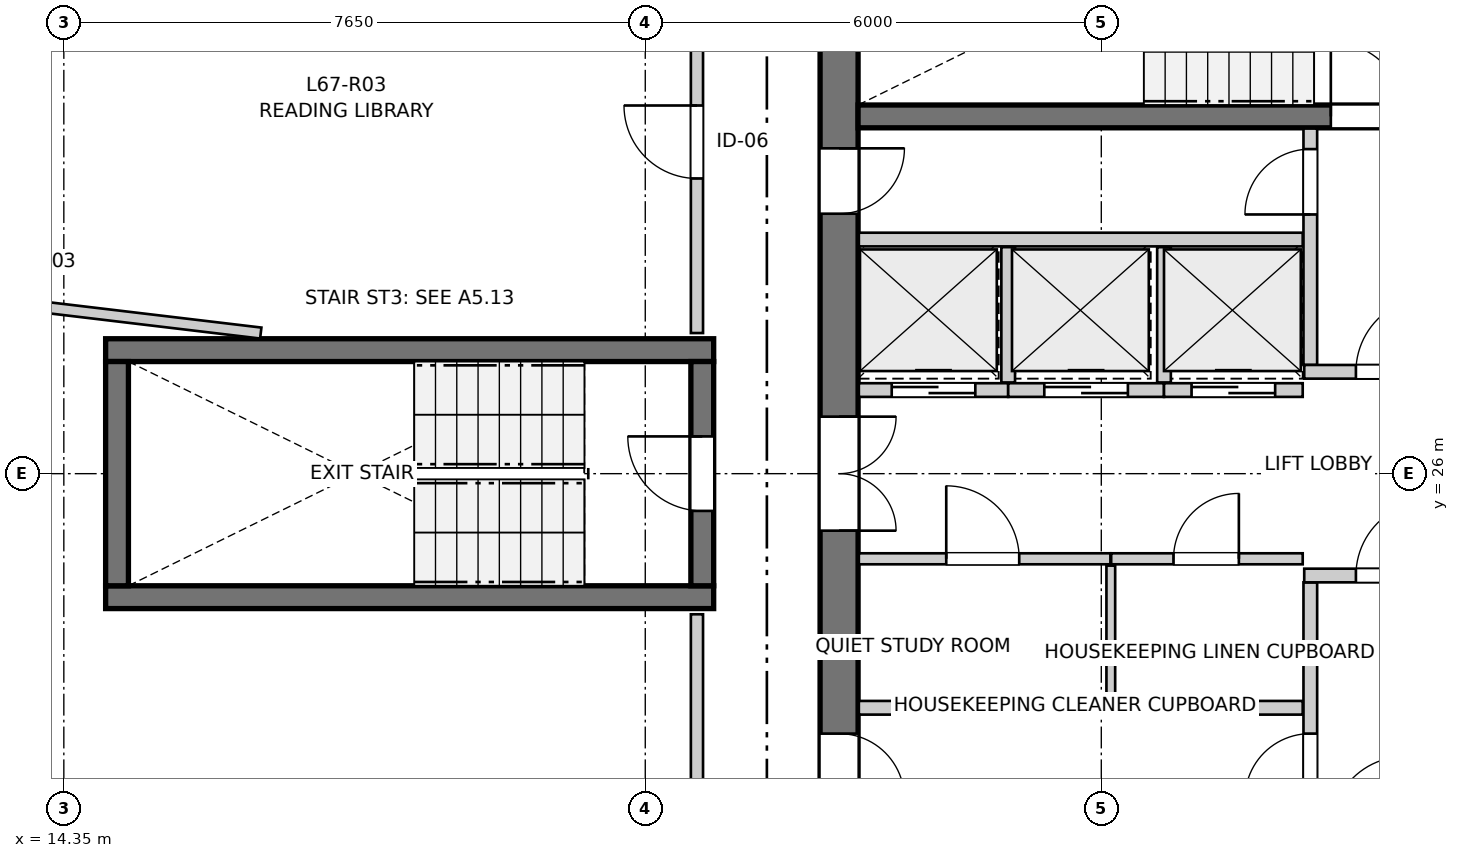
"""IFC4 building model, lengths in metres.
Left out: names, types, materials, properties, quantities, classifications, styles, units other than length and angle.
Written with IfcOpenShell. Run it as: python <this file> out.ifc"""

import sys

from ifc_helpers import new_model, si_unit, direction, frame, frame_2d, origin, place, context, subcontext, project, spatial, rectangle, extrude, source, transform, mapped, element, fill, save


model = new_model("IFC4")
c1 = context("Model", 3, precision=1e-05, world=origin(), true_north=direction((0.0, 1.0)))
c2 = subcontext(c1, "Body", "Model", "MODEL_VIEW")
j1 = project(units=[si_unit("LENGTHUNIT", "METRE"), si_unit("PLANEANGLEUNIT", "RADIAN")], contexts=[c1])
p1 = place(None, origin())
s1 = spatial("IfcSite", under=j1, at=p1, CompositionType="ELEMENT")
p2 = place(p1, origin())
s2 = spatial("IfcBuilding", under=s1, at=p2, CompositionType="ELEMENT")
p3 = place(p2, frame((0.0, 0.0, 224.4)))
s3 = spatial("IfcBuildingStorey", under=s2, at=p3, CompositionType="ELEMENT", Elevation=224.4)
p4 = place(p3, frame((24.55, 33.8, 0.0), z_axis=(0.0, 0.0, 1.0), x_axis=(0.0, -1.0, 0.0)))
e1 = element("IfcWall", 1, at=p4, inside=s3, PredefinedType="SHEAR", context=c2, shape_type="SweptSolid", body=[
    extrude(rectangle(XDim=15.6, YDim=0.5, at=frame_2d((7.8, 0.0))), origin(), (0.0, 0.0, 1.0), 2.96),
])
p5 = place(p4, frame((7.05, 0.0, 0.0)))
e2 = element("IfcOpeningElement", 2, at=p5, cuts=e1, PredefinedType="OPENING", context=c2, shape_type="SweptSolid", body=[
    extrude(rectangle(XDim=1.5, YDim=2.15, at=frame_2d((0.75, 1.075))), frame((0.0, 0.26, 0.0), z_axis=(0.0, -1.0, 0.0), x_axis=(1.0, 0.0, 0.0)), (0.0, 0.0, 1.0), 0.52),
])
p6 = place(p4, frame((3.52, 0.0, 0.0)))
e3 = element("IfcOpeningElement", 3, at=p6, cuts=e1, PredefinedType="OPENING", context=c2, shape_type="SweptSolid", body=[
    extrude(rectangle(XDim=0.86, YDim=2.05, at=frame_2d((0.43, 1.025))), frame((0.0, 0.26, 0.0), z_axis=(0.0, -1.0, 0.0), x_axis=(1.0, 0.0, 0.0)), (0.0, 0.0, 1.0), 0.52),
])
p7 = place(p4, frame((11.22, 0.0, 0.0)))
e4 = element("IfcOpeningElement", 4, at=p7, cuts=e1, PredefinedType="OPENING", context=c2, shape_type="SweptSolid", body=[
    extrude(rectangle(XDim=0.86, YDim=2.05, at=frame_2d((0.43, 1.025))), frame((0.0, 0.26, 0.0), z_axis=(0.0, -1.0, 0.0), x_axis=(1.0, 0.0, 0.0)), (0.0, 0.0, 1.0), 0.52),
])
p8 = place(p3, frame((24.8, 30.7, 0.0), z_axis=(0.0, 0.0, 1.0), x_axis=(1.0, 0.0, 0.0)))
e5 = element("IfcWall", 5, at=p8, inside=s3, PredefinedType="SHEAR", context=c2, shape_type="SweptSolid", body=[
    extrude(rectangle(XDim=11.1, YDim=0.3, at=frame_2d((5.55, 0.0))), origin(), (0.0, 0.0, 1.0), 2.96),
])
p9 = place(p8, frame((6.22, 0.0, 0.0)))
e6 = element("IfcOpeningElement", 6, at=p9, cuts=e5, PredefinedType="OPENING", context=c2, shape_type="SweptSolid", body=[
    extrude(rectangle(XDim=0.98, YDim=2.15, at=frame_2d((0.49, 1.075))), frame((0.0, 0.16, 0.0), z_axis=(0.0, -1.0, 0.0), x_axis=(1.0, 0.0, 0.0)), (0.0, 0.0, 1.0), 0.32),
])
p10 = place(p8, frame((9.15, 0.0, 0.0)))
e7 = element("IfcOpeningElement", 7, at=p10, cuts=e5, PredefinedType="OPENING", context=c2, shape_type="SweptSolid", body=[
    extrude(rectangle(XDim=1.15, YDim=2.15, at=frame_2d((0.575, 1.075))), frame((0.0, 0.16, 0.0), z_axis=(0.0, -1.0, 0.0), x_axis=(1.0, 0.0, 0.0)), (0.0, 0.0, 1.0), 0.32),
])
for number, where, z_axis, x_axis in (
    (8, (14.9, 24.375, 0.0), (0.0, 0.0, 1.0), (1.0, 0.0, 0.0)),
    (9, (22.9, 27.625, 0.0), (0.0, 0.0, 1.0), (-1.0, 0.0, 0.0)),
):
    element("IfcWall", number, at=place(p3, frame(where, z_axis=z_axis, x_axis=x_axis)), inside=s3, PredefinedType="SHEAR", context=c2, shape_type="SweptSolid", body=[
        extrude(rectangle(XDim=8.0, YDim=0.3, at=frame_2d((4.0, 0.0))), origin(), (0.0, 0.0, 1.0), 2.96),
    ])
p11 = place(p3, frame((15.05, 27.475, 0.0), z_axis=(0.0, 0.0, 1.0), x_axis=(0.0, -1.0, 0.0)))
e10 = element("IfcWall", 10, at=p11, inside=s3, PredefinedType="SHEAR", context=c2, shape_type="SweptSolid", body=[
    extrude(rectangle(XDim=2.95, YDim=0.3, at=frame_2d((1.475, 0.0))), origin(), (0.0, 0.0, 1.0), 2.96),
])
p12 = place(p3, frame((22.75, 24.525, 0.0), z_axis=(0.0, 0.0, 1.0), x_axis=(0.0, 1.0, 0.0)))
e11 = element("IfcWall", 11, at=p12, inside=s3, PredefinedType="SHEAR", context=c2, shape_type="SweptSolid", body=[
    extrude(rectangle(XDim=2.95, YDim=0.3, at=frame_2d((1.475, 0.0))), origin(), (0.0, 0.0, 1.0), 2.96),
])
p13 = place(p12, frame((0.985, 0.0, 0.0)))
e12 = element("IfcOpeningElement", 12, at=p13, cuts=e11, PredefinedType="OPENING", context=c2, shape_type="SweptSolid", body=[
    extrude(rectangle(XDim=0.98, YDim=2.15, at=frame_2d((0.49, 1.075))), frame((0.0, 0.16, 0.0), z_axis=(0.0, -1.0, 0.0), x_axis=(1.0, 0.0, 0.0)), (0.0, 0.0, 1.0), 0.32),
])
p14 = place(p3, frame((14.65, 32.607, 0.0), z_axis=(0.0, 0.0, 1.0), x_axis=(-0.657629046069, -0.753341912923, 0.0)))
e13 = element("IfcWall", 13, at=p14, inside=s3, PredefinedType="SOLIDWALL", context=c2, shape_type="SweptSolid", body=[
    extrude(rectangle(XDim=2.153, YDim=0.32, at=frame_2d((1.076, 0.0))), origin(), (0.0, 0.0, 1.0), 2.58),
])
p15 = place(p14, frame((0.316, 0.0, 0.82)))
e14 = element("IfcOpeningElement", 14, at=p15, cuts=e13, PredefinedType="OPENING", context=c2, shape_type="SweptSolid", body=[
    extrude(rectangle(XDim=1.45, YDim=1.25, at=frame_2d((0.725, 0.625))), frame((0.0, 0.17, 0.0), z_axis=(0.0, -1.0, 0.0), x_axis=(1.0, 0.0, 0.0)), (0.0, 0.0, 1.0), 0.34),
])
p16 = place(p3, frame((30.75, 21.46, 0.0), z_axis=(0.0, 0.0, 1.0), x_axis=(0.0, 1.0, 0.0)))
e15 = element("IfcWall", 15, at=p16, inside=s3, PredefinedType="PARTITIONING", context=c2, shape_type="SweptSolid", body=[
    extrude(rectangle(XDim=3.11, YDim=0.18, at=frame_2d((1.555, 0.0))), origin(), (0.0, 0.0, 1.0), 2.96),
])
p17 = place(p16, frame((0.26, 0.0, 0.0)))
e16 = element("IfcOpeningElement", 16, at=p17, cuts=e15, PredefinedType="OPENING", context=c2, shape_type="SweptSolid", body=[
    extrude(rectangle(XDim=0.86, YDim=2.05, at=frame_2d((0.43, 1.025))), frame((0.0, 0.1, 0.0), z_axis=(0.0, -1.0, 0.0), x_axis=(1.0, 0.0, 0.0)), (0.0, 0.0, 1.0), 0.2),
])
p18 = place(p3, frame((30.67, 24.66, 0.0), z_axis=(0.0, 0.0, 1.0), x_axis=(1.0, 0.0, 0.0)))
e17 = element("IfcWall", 17, at=p18, inside=s3, PredefinedType="PARTITIONING", context=c2, shape_type="SweptSolid", body=[
    extrude(rectangle(XDim=5.22, YDim=0.18, at=frame_2d((2.61, 0.0))), origin(), (0.0, 0.0, 1.0), 2.96),
])
p19 = place(p18, frame((0.68, 0.0, 0.0)))
e18 = element("IfcOpeningElement", 18, at=p19, cuts=e17, PredefinedType="OPENING", context=c2, shape_type="SweptSolid", body=[
    extrude(rectangle(XDim=0.98, YDim=2.15, at=frame_2d((0.49, 1.075))), frame((0.0, 0.1, 0.0), z_axis=(0.0, -1.0, 0.0), x_axis=(1.0, 0.0, 0.0)), (0.0, 0.0, 1.0), 0.2),
])
p20 = place(p3, frame((30.75, 27.43, 0.0), z_axis=(0.0, 0.0, 1.0), x_axis=(0.0, 1.0, 0.0)))
e19 = element("IfcWall", 19, at=p20, inside=s3, PredefinedType="PARTITIONING", context=c2, shape_type="SweptSolid", body=[
    extrude(rectangle(XDim=3.11, YDim=0.18, at=frame_2d((1.555, 0.0))), origin(), (0.0, 0.0, 1.0), 2.96),
])
p21 = place(p20, frame((1.98, 0.0, 0.0)))
e20 = element("IfcOpeningElement", 20, at=p21, cuts=e19, PredefinedType="OPENING", context=c2, shape_type="SweptSolid", body=[
    extrude(rectangle(XDim=0.86, YDim=2.05, at=frame_2d((0.43, 1.025))), frame((0.0, 0.1, 0.0), z_axis=(0.0, -1.0, 0.0), x_axis=(1.0, 0.0, 0.0)), (0.0, 0.0, 1.0), 0.2),
])
p22 = place(p3, frame((30.67, 27.34, 0.0), z_axis=(0.0, 0.0, 1.0), x_axis=(1.0, 0.0, 0.0)))
e21 = element("IfcWall", 21, at=p22, inside=s3, PredefinedType="PARTITIONING", context=c2, shape_type="SweptSolid", body=[
    extrude(rectangle(XDim=5.22, YDim=0.18, at=frame_2d((2.61, 0.0))), origin(), (0.0, 0.0, 1.0), 2.96),
])
p23 = place(p22, frame((0.68, 0.0, 0.0)))
e22 = element("IfcOpeningElement", 22, at=p23, cuts=e21, PredefinedType="OPENING", context=c2, shape_type="SweptSolid", body=[
    extrude(rectangle(XDim=0.98, YDim=2.15, at=frame_2d((0.49, 1.075))), frame((0.0, 0.1, 0.0), z_axis=(0.0, -1.0, 0.0), x_axis=(1.0, 0.0, 0.0)), (0.0, 0.0, 1.0), 0.2),
])
p24 = place(p3, frame((24.81, 22.92, 0.0), z_axis=(0.0, 0.0, 1.0), x_axis=(1.0, 0.0, 0.0)))
e23 = element("IfcWall", 23, at=p24, inside=s3, PredefinedType="PARTITIONING", context=c2, shape_type="SweptSolid", body=[
    extrude(rectangle(XDim=5.84, YDim=0.18, at=frame_2d((2.92, 0.0))), origin(), (0.0, 0.0, 1.0), 2.96),
])
p25 = place(p3, frame((24.81, 24.88, 0.0), z_axis=(0.0, 0.0, 1.0), x_axis=(1.0, 0.0, 0.0)))
e24 = element("IfcWall", 24, at=p25, inside=s3, PredefinedType="PARTITIONING", context=c2, shape_type="SweptSolid", body=[
    extrude(rectangle(XDim=3.31, YDim=0.145, at=frame_2d((1.655, 0.0))), origin(), (0.0, 0.0, 1.0), 2.96),
])
p26 = place(p25, frame((1.15, 0.0, 0.0)))
e25 = element("IfcOpeningElement", 25, at=p26, cuts=e24, PredefinedType="OPENING", context=c2, shape_type="SweptSolid", body=[
    extrude(rectangle(XDim=0.96, YDim=2.1, at=frame_2d((0.48, 1.05))), frame((0.0, 0.083, 0.0), z_axis=(0.0, -1.0, 0.0), x_axis=(1.0, 0.0, 0.0)), (0.0, 0.0, 1.0), 0.165),
])
p27 = place(p3, frame((28.13, 24.88, 0.0), z_axis=(0.0, 0.0, 1.0), x_axis=(1.0, 0.0, 0.0)))
e26 = element("IfcWall", 26, at=p27, inside=s3, PredefinedType="PARTITIONING", context=c2, shape_type="SweptSolid", body=[
    extrude(rectangle(XDim=2.52, YDim=0.145, at=frame_2d((1.26, 0.0))), origin(), (0.0, 0.0, 1.0), 2.96),
])
p28 = place(p27, frame((0.82, 0.0, 0.0)))
e27 = element("IfcOpeningElement", 27, at=p28, cuts=e26, PredefinedType="OPENING", context=c2, shape_type="SweptSolid", body=[
    extrude(rectangle(XDim=0.86, YDim=2.05, at=frame_2d((0.43, 1.025))), frame((0.0, 0.083, 0.0), z_axis=(0.0, -1.0, 0.0), x_axis=(1.0, 0.0, 0.0)), (0.0, 0.0, 1.0), 0.165),
])
p29 = place(p3, frame((28.125, 23.02, 0.0), z_axis=(0.0, 0.0, 1.0), x_axis=(0.0, 1.0, 0.0)))
e28 = element("IfcWall", 28, at=p29, inside=s3, PredefinedType="PARTITIONING", context=c2, shape_type="SweptSolid", body=[
    extrude(rectangle(XDim=1.77, YDim=0.115, at=frame_2d((0.885, 0.0))), origin(), (0.0, 0.0, 1.0), 2.96),
])
p30 = place(p3, frame((24.81, 29.08, 0.0), z_axis=(0.0, 0.0, 1.0), x_axis=(1.0, 0.0, 0.0)))
e29 = element("IfcWall", 29, at=p30, inside=s3, PredefinedType="PARTITIONING", context=c2, shape_type="SweptSolid", body=[
    extrude(rectangle(XDim=5.84, YDim=0.18, at=frame_2d((2.92, 0.0))), origin(), (0.0, 0.0, 1.0), 2.96),
])
p31 = place(p3, frame((24.81, 27.1, 0.0), z_axis=(0.0, 0.0, 1.0), x_axis=(1.0, 0.0, 0.0)))
e30 = element("IfcWall", 30, at=p31, inside=s3, PredefinedType="PARTITIONING", context=c2, shape_type="SweptSolid", body=[
    extrude(rectangle(XDim=1.965, YDim=0.18, at=frame_2d((0.982, 0.0))), origin(), (0.0, 0.0, 1.0), 2.96),
])
p32 = place(p31, frame((0.433, 0.0, 0.0)))
e31 = element("IfcOpeningElement", 31, at=p32, cuts=e30, PredefinedType="OPENING", context=c2, shape_type="SweptSolid", body=[
    extrude(rectangle(XDim=1.1, YDim=2.15, at=frame_2d((0.55, 1.075))), frame((0.0, 0.1, 0.0), z_axis=(0.0, -1.0, 0.0), x_axis=(1.0, 0.0, 0.0)), (0.0, 0.0, 1.0), 0.2),
])
p33 = place(p3, frame((26.775, 27.1, 0.0), z_axis=(0.0, 0.0, 1.0), x_axis=(1.0, 0.0, 0.0)))
e32 = element("IfcWall", 32, at=p33, inside=s3, PredefinedType="PARTITIONING", context=c2, shape_type="SweptSolid", body=[
    extrude(rectangle(XDim=2.05, YDim=0.18, at=frame_2d((1.025, 0.0))), origin(), (0.0, 0.0, 1.0), 2.96),
])
p34 = place(p33, frame((0.475, 0.0, 0.0)))
e33 = element("IfcOpeningElement", 33, at=p34, cuts=e32, PredefinedType="OPENING", context=c2, shape_type="SweptSolid", body=[
    extrude(rectangle(XDim=1.1, YDim=2.15, at=frame_2d((0.55, 1.075))), frame((0.0, 0.1, 0.0), z_axis=(0.0, -1.0, 0.0), x_axis=(1.0, 0.0, 0.0)), (0.0, 0.0, 1.0), 0.2),
])
p35 = place(p3, frame((26.775, 27.2, 0.0), z_axis=(0.0, 0.0, 1.0), x_axis=(0.0, 1.0, 0.0)))
e34 = element("IfcWall", 34, at=p35, inside=s3, PredefinedType="PARTITIONING", context=c2, shape_type="SweptSolid", body=[
    extrude(rectangle(XDim=1.78, YDim=0.18, at=frame_2d((0.89, 0.0))), origin(), (0.0, 0.0, 1.0), 2.96),
])
p36 = place(p3, frame((28.825, 27.1, 0.0), z_axis=(0.0, 0.0, 1.0), x_axis=(1.0, 0.0, 0.0)))
e35 = element("IfcWall", 35, at=p36, inside=s3, PredefinedType="PARTITIONING", context=c2, shape_type="SweptSolid", body=[
    extrude(rectangle(XDim=1.825, YDim=0.18, at=frame_2d((0.913, 0.0))), origin(), (0.0, 0.0, 1.0), 2.96),
])
p37 = place(p36, frame((0.363, 0.0, 0.0)))
e36 = element("IfcOpeningElement", 36, at=p37, cuts=e35, PredefinedType="OPENING", context=c2, shape_type="SweptSolid", body=[
    extrude(rectangle(XDim=1.1, YDim=2.15, at=frame_2d((0.55, 1.075))), frame((0.0, 0.1, 0.0), z_axis=(0.0, -1.0, 0.0), x_axis=(1.0, 0.0, 0.0)), (0.0, 0.0, 1.0), 0.2),
])
p38 = place(p3, frame((28.825, 27.2, 0.0), z_axis=(0.0, 0.0, 1.0), x_axis=(0.0, 1.0, 0.0)))
e37 = element("IfcWall", 37, at=p38, inside=s3, PredefinedType="PARTITIONING", context=c2, shape_type="SweptSolid", body=[
    extrude(rectangle(XDim=1.78, YDim=0.18, at=frame_2d((0.89, 0.0))), origin(), (0.0, 0.0, 1.0), 2.96),
])
p39 = place(p3, frame((22.68, 17.653, 0.0), z_axis=(0.0, 0.0, 1.0), x_axis=(0.0, 1.0, 0.0)))
e38 = element("IfcWall", 38, at=p39, inside=s3, PredefinedType="PARTITIONING", context=c2, shape_type="SweptSolid", body=[
    extrude(rectangle(XDim=6.497, YDim=0.16, at=frame_2d((3.249, 0.0))), origin(), (0.0, 0.0, 1.0), 2.96),
])
p40 = place(p39, frame((2.796, 0.0, 0.0)))
e39 = element("IfcOpeningElement", 39, at=p40, cuts=e38, PredefinedType="OPENING", context=c2, shape_type="SweptSolid", body=[
    extrude(rectangle(XDim=0.96, YDim=2.1, at=frame_2d((0.48, 1.05))), frame((0.0, 0.09, 0.0), z_axis=(0.0, -1.0, 0.0), x_axis=(1.0, 0.0, 0.0)), (0.0, 0.0, 1.0), 0.18),
])
p41 = place(p3, frame((22.68, 27.85, 0.0), z_axis=(0.0, 0.0, 1.0), x_axis=(0.0, 1.0, 0.0)))
e40 = element("IfcWall", 40, at=p41, inside=s3, PredefinedType="PARTITIONING", context=c2, shape_type="SweptSolid", body=[
    extrude(rectangle(XDim=4.988, YDim=0.16, at=frame_2d((2.494, 0.0))), origin(), (0.0, 0.0, 1.0), 2.96),
])
p42 = place(p41, frame((2.033, 0.0, 0.0)))
e41 = element("IfcOpeningElement", 41, at=p42, cuts=e40, PredefinedType="OPENING", context=c2, shape_type="SweptSolid", body=[
    extrude(rectangle(XDim=0.96, YDim=2.1, at=frame_2d((0.48, 1.05))), frame((0.0, 0.09, 0.0), z_axis=(0.0, -1.0, 0.0), x_axis=(1.0, 0.0, 0.0)), (0.0, 0.0, 1.0), 0.18),
])
p43 = place(p3, frame((11.205, 28.534, 0.0), z_axis=(0.0, 0.0, 1.0), x_axis=(0.9929685345, -0.118378585449, 0.0)))
e42 = element("IfcWall", 42, at=p43, inside=s3, PredefinedType="PARTITIONING", context=c2, shape_type="SweptSolid", body=[
    extrude(rectangle(XDim=5.777, YDim=0.145, at=frame_2d((2.888, 0.0))), origin(), (0.0, 0.0, 1.0), 2.96),
])
m1 = source(origin(), c2, "Body", "SweptSolid", [
    extrude(rectangle(XDim=1.45, YDim=1.25, at=frame_2d((0.725, 0.625))), frame((0.0, 0.03, 0.0), z_axis=(0.0, -1.0, 0.0), x_axis=(1.0, 0.0, 0.0)), (0.0, 0.0, 1.0), 0.06),
])
p44 = place(p15, origin())
e43 = element("IfcWindow", 43, at=p44, inside=s3, PartitioningType="SINGLE_PANEL", PredefinedType="WINDOW", context=c2, shape_type="MappedRepresentation", body=[
    mapped(m1, transform((0.0, 0.0, 0.0), x_axis=(1.0, 0.0, 0.0), y_axis=(0.0, 1.0, 0.0), z_axis=(0.0, 0.0, 1.0), scale=1.0)),
])
fill(e14, e43)
m2 = source(origin(), c2, "Body", "SweptSolid", [
    extrude(rectangle(XDim=0.98, YDim=2.15, at=frame_2d((0.49, 1.075))), frame((0.0, 0.025, 0.0), z_axis=(0.0, -1.0, 0.0), x_axis=(1.0, 0.0, 0.0)), (0.0, 0.0, 1.0), 0.05),
])
p45 = place(p9, origin())
e44 = element("IfcDoor", 44, at=p45, inside=s3, OperationType="SINGLE_SWING_LEFT", PredefinedType="DOOR", context=c2, shape_type="MappedRepresentation", body=[
    mapped(m2, transform((0.0, 0.0, 0.0), x_axis=(1.0, 0.0, 0.0), y_axis=(0.0, 1.0, 0.0), z_axis=(0.0, 0.0, 1.0), scale=1.0)),
])
fill(e6, e44)
p46 = place(p13, origin())
e45 = element("IfcDoor", 45, at=p46, inside=s3, OperationType="SINGLE_SWING_RIGHT", PredefinedType="DOOR", context=c2, shape_type="MappedRepresentation", body=[
    mapped(m2, transform((0.0, 0.0, 0.0), x_axis=(1.0, 0.0, 0.0), y_axis=(0.0, 1.0, 0.0), z_axis=(0.0, 0.0, 1.0), scale=1.0)),
])
fill(e12, e45)
m3 = source(origin(), c2, "Body", "SweptSolid", [
    extrude(rectangle(XDim=1.5, YDim=2.15, at=frame_2d((0.75, 1.075))), frame((0.0, 0.025, 0.0), z_axis=(0.0, -1.0, 0.0), x_axis=(1.0, 0.0, 0.0)), (0.0, 0.0, 1.0), 0.05),
])
p47 = place(p5, origin())
e46 = element("IfcDoor", 46, at=p47, inside=s3, OperationType="DOUBLE_DOOR_SINGLE_SWING", PredefinedType="DOOR", context=c2, shape_type="MappedRepresentation", body=[
    mapped(m3, transform((0.0, 0.0, 0.0), x_axis=(1.0, 0.0, 0.0), y_axis=(0.0, 1.0, 0.0), z_axis=(0.0, 0.0, 1.0), scale=1.0)),
])
fill(e2, e46)
m4 = source(origin(), c2, "Body", "SweptSolid", [
    extrude(rectangle(XDim=0.86, YDim=2.05, at=frame_2d((0.43, 1.025))), frame((0.0, 0.025, 0.0), z_axis=(0.0, -1.0, 0.0), x_axis=(1.0, 0.0, 0.0)), (0.0, 0.0, 1.0), 0.05),
])
p48 = place(p6, origin())
e47 = element("IfcDoor", 47, at=p48, inside=s3, OperationType="SINGLE_SWING_LEFT", PredefinedType="DOOR", context=c2, shape_type="MappedRepresentation", body=[
    mapped(m4, transform((0.0, 0.0, 0.0), x_axis=(1.0, 0.0, 0.0), y_axis=(0.0, 1.0, 0.0), z_axis=(0.0, 0.0, 1.0), scale=1.0)),
])
fill(e3, e47)
p49 = place(p7, origin())
e48 = element("IfcDoor", 48, at=p49, inside=s3, OperationType="SINGLE_SWING_RIGHT", PredefinedType="DOOR", context=c2, shape_type="MappedRepresentation", body=[
    mapped(m4, transform((0.0, 0.0, 0.0), x_axis=(1.0, 0.0, 0.0), y_axis=(0.0, 1.0, 0.0), z_axis=(0.0, 0.0, 1.0), scale=1.0)),
])
fill(e4, e48)
p50 = place(p17, origin())
e49 = element("IfcDoor", 49, at=p50, inside=s3, OperationType="SINGLE_SWING_LEFT", PredefinedType="DOOR", context=c2, shape_type="MappedRepresentation", body=[
    mapped(m4, transform((0.0, 0.0, 0.0), x_axis=(1.0, 0.0, 0.0), y_axis=(0.0, 1.0, 0.0), z_axis=(0.0, 0.0, 1.0), scale=1.0)),
])
fill(e16, e49)
p51 = place(p19, origin())
e50 = element("IfcDoor", 50, at=p51, inside=s3, OperationType="SINGLE_SWING_RIGHT", PredefinedType="DOOR", context=c2, shape_type="MappedRepresentation", body=[
    mapped(m2, transform((0.0, 0.0, 0.0), x_axis=(1.0, 0.0, 0.0), y_axis=(0.0, 1.0, 0.0), z_axis=(0.0, 0.0, 1.0), scale=1.0)),
])
fill(e18, e50)
p52 = place(p21, origin())
e51 = element("IfcDoor", 51, at=p52, inside=s3, OperationType="SINGLE_SWING_LEFT", PredefinedType="DOOR", context=c2, shape_type="MappedRepresentation", body=[
    mapped(m4, transform((0.0, 0.0, 0.0), x_axis=(1.0, 0.0, 0.0), y_axis=(0.0, 1.0, 0.0), z_axis=(0.0, 0.0, 1.0), scale=1.0)),
])
fill(e20, e51)
p53 = place(p23, origin())
e52 = element("IfcDoor", 52, at=p53, inside=s3, OperationType="SINGLE_SWING_RIGHT", PredefinedType="DOOR", context=c2, shape_type="MappedRepresentation", body=[
    mapped(m2, transform((0.0, 0.0, 0.0), x_axis=(1.0, 0.0, 0.0), y_axis=(0.0, 1.0, 0.0), z_axis=(0.0, 0.0, 1.0), scale=1.0)),
])
fill(e22, e52)
m5 = source(origin(), c2, "Body", "SweptSolid", [
    extrude(rectangle(XDim=0.96, YDim=2.1, at=frame_2d((0.48, 1.05))), frame((0.0, 0.025, 0.0), z_axis=(0.0, -1.0, 0.0), x_axis=(1.0, 0.0, 0.0)), (0.0, 0.0, 1.0), 0.05),
])
p54 = place(p26, origin())
e53 = element("IfcDoor", 53, at=p54, inside=s3, OperationType="SINGLE_SWING_LEFT", PredefinedType="DOOR", context=c2, shape_type="MappedRepresentation", body=[
    mapped(m5, transform((0.0, 0.0, 0.0), x_axis=(1.0, 0.0, 0.0), y_axis=(0.0, 1.0, 0.0), z_axis=(0.0, 0.0, 1.0), scale=1.0)),
])
fill(e25, e53)
p55 = place(p28, origin())
e54 = element("IfcDoor", 54, at=p55, inside=s3, OperationType="SINGLE_SWING_RIGHT", PredefinedType="DOOR", context=c2, shape_type="MappedRepresentation", body=[
    mapped(m4, transform((0.0, 0.0, 0.0), x_axis=(1.0, 0.0, 0.0), y_axis=(0.0, 1.0, 0.0), z_axis=(0.0, 0.0, 1.0), scale=1.0)),
])
fill(e27, e54)
m6 = source(origin(), c2, "Body", "SweptSolid", [
    extrude(rectangle(XDim=1.1, YDim=2.15, at=frame_2d((0.55, 1.075))), frame((0.0, 0.025, 0.0), z_axis=(0.0, -1.0, 0.0), x_axis=(1.0, 0.0, 0.0)), (0.0, 0.0, 1.0), 0.05),
])
p56 = place(p32, origin())
e55 = element("IfcDoor", 55, at=p56, inside=s3, OperationType="DOUBLE_DOOR_SLIDING", PredefinedType="DOOR", context=c2, shape_type="MappedRepresentation", body=[
    mapped(m6, transform((0.0, 0.0, 0.0), x_axis=(1.0, 0.0, 0.0), y_axis=(0.0, 1.0, 0.0), z_axis=(0.0, 0.0, 1.0), scale=1.0)),
])
fill(e31, e55)
p57 = place(p34, origin())
e56 = element("IfcDoor", 56, at=p57, inside=s3, OperationType="DOUBLE_DOOR_SLIDING", PredefinedType="DOOR", context=c2, shape_type="MappedRepresentation", body=[
    mapped(m6, transform((0.0, 0.0, 0.0), x_axis=(1.0, 0.0, 0.0), y_axis=(0.0, 1.0, 0.0), z_axis=(0.0, 0.0, 1.0), scale=1.0)),
])
fill(e33, e56)
p58 = place(p37, origin())
e57 = element("IfcDoor", 57, at=p58, inside=s3, OperationType="DOUBLE_DOOR_SLIDING", PredefinedType="DOOR", context=c2, shape_type="MappedRepresentation", body=[
    mapped(m6, transform((0.0, 0.0, 0.0), x_axis=(1.0, 0.0, 0.0), y_axis=(0.0, 1.0, 0.0), z_axis=(0.0, 0.0, 1.0), scale=1.0)),
])
fill(e36, e57)
p59 = place(p42, origin())
e58 = element("IfcDoor", 58, at=p59, inside=s3, OperationType="SINGLE_SWING_RIGHT", PredefinedType="DOOR", context=c2, shape_type="MappedRepresentation", body=[
    mapped(m5, transform((0.0, 0.0, 0.0), x_axis=(1.0, 0.0, 0.0), y_axis=(0.0, 1.0, 0.0), z_axis=(0.0, 0.0, 1.0), scale=1.0)),
])
fill(e41, e58)
save(model, sys.argv[1])
